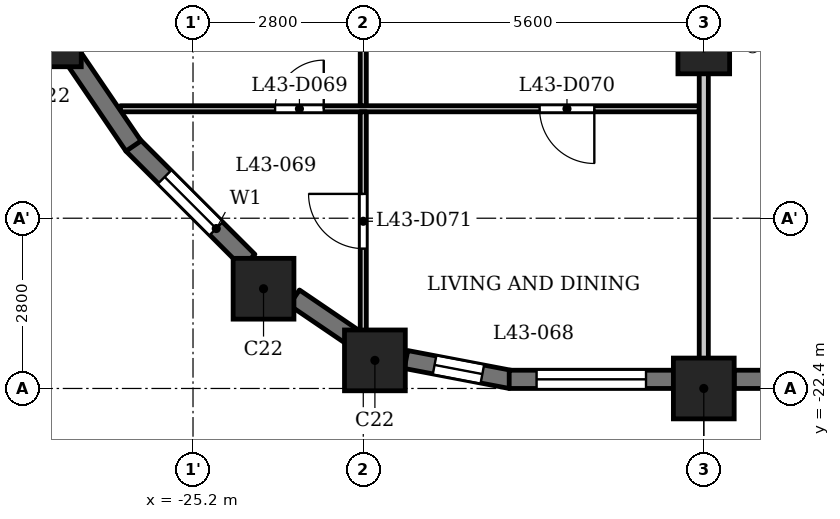
"""IFC4 building model, lengths in metres.
Left out: names, types, materials, properties, quantities, classifications, styles, units other than length and angle.
Written with IfcOpenShell. Run it as: python <this file> out.ifc"""

import sys

from ifc_helpers import new_model, si_unit, direction, frame, frame_2d, origin, origin_2d, place, context, subcontext, project, spatial, rectangle, extrude, element, fill, save


model = new_model("IFC4")
c1 = context("Model", 3, precision=1e-05, world=origin(), true_north=direction((0.0, 1.0)))
c2 = subcontext(c1, "Body", "Model", "MODEL_VIEW")
j1 = project(units=[si_unit("LENGTHUNIT", "METRE"), si_unit("PLANEANGLEUNIT", "RADIAN")], contexts=[c1])
p1 = place(None, origin())
s1 = spatial("IfcSite", under=j1, at=p1, CompositionType="ELEMENT")
p2 = place(p1, origin())
s2 = spatial("IfcBuilding", under=s1, at=p2, CompositionType="ELEMENT")
p3 = place(p2, frame((0.0, 0.0, 167.6)))
s3 = spatial("IfcBuildingStorey", under=s2, at=p3, CompositionType="ELEMENT", Elevation=167.6)
for number, where, z_axis, x_axis in (
    (1, (-22.209, -21.938, 0.0), (0.0, 0.0, 1.0), (1.0, 0.0, 0.0)),
    (2, (-16.8, -22.4, 0.0), (0.0, 0.0, 1.0), (1.0, 0.0, 0.0)),
    (3, (-27.538, -16.609, 0.0), (0.0, 0.0, 1.0), (1.0, 0.0, 0.0)),
    (4, (-24.04, -20.76, 0.0), (0.0, 0.0, 1.0), (1.0, 0.0, 0.0)),
):
    element("IfcColumn", number, at=place(p3, frame(where, z_axis=z_axis, x_axis=x_axis)), inside=s3, PredefinedType="COLUMN", context=c2, shape_type="SweptSolid", body=[
        extrude(rectangle(XDim=1.0, YDim=1.0, at=origin_2d()), origin(), (0.0, 0.0, 1.0), 3.5),
    ])
p4 = place(p3, frame((-16.8, -16.8, 0.0), z_axis=(0.0, 0.0, 1.0), x_axis=(1.0, 0.0, 0.0)))
e5 = element("IfcColumn", 5, at=p4, inside=s3, PredefinedType="COLUMN", context=c2, shape_type="SweptSolid", body=[
    extrude(rectangle(XDim=0.85, YDim=0.85, at=origin_2d()), origin(), (0.0, 0.0, 1.0), 3.5),
])
p5 = place(p3, frame((-26.197, -18.391, 0.0), z_axis=(0.0, 0.0, 1.0), x_axis=(0.707061571201, -0.707151988282, 0.0)))
e6 = element("IfcWall", 6, at=p5, inside=s3, PredefinedType="SOLIDWALL", context=c2, shape_type="SweptSolid", body=[
    extrude(rectangle(XDim=2.7, YDim=0.3, at=frame_2d((1.35, 0.0))), origin(), (0.0, 0.0, 1.0), 2.45),
])
p6 = place(p5, frame((0.75, 0.0, 0.6)))
e7 = element("IfcOpeningElement", 7, at=p6, cuts=e6, PredefinedType="OPENING", context=c2, shape_type="SweptSolid", body=[
    extrude(rectangle(XDim=1.2, YDim=1.55, at=frame_2d((0.6, 0.775))), frame((0.0, 0.16, 0.0), z_axis=(0.0, -1.0, 0.0), x_axis=(1.0, 0.0, 0.0)), (0.0, 0.0, 1.0), 0.32),
])
p7 = place(p3, frame((-23.534, -20.904, 0.0), z_axis=(0.0, 0.0, 1.0), x_axis=(0.827103906596, -0.56204904385, 0.0)))
e8 = element("IfcWall", 8, at=p7, inside=s3, PredefinedType="SOLIDWALL", context=c2, shape_type="SweptSolid", body=[
    extrude(rectangle(XDim=1.177, YDim=0.3, at=frame_2d((0.589, 0.0))), origin(), (0.0, 0.0, 1.0), 3.2),
])
p8 = place(p3, frame((-21.697, -21.924, 0.0), z_axis=(0.0, 0.0, 1.0), x_axis=(0.982284988433, -0.187393173565, 0.0)))
e9 = element("IfcWall", 9, at=p8, inside=s3, PredefinedType="SOLIDWALL", context=c2, shape_type="SweptSolid", body=[
    extrude(rectangle(XDim=1.756, YDim=0.3, at=frame_2d((0.878, 0.0))), origin(), (0.0, 0.0, 1.0), 2.45),
])
p9 = place(p8, frame((0.478, 0.0, 0.6)))
e10 = element("IfcOpeningElement", 10, at=p9, cuts=e9, PredefinedType="OPENING", context=c2, shape_type="SweptSolid", body=[
    extrude(rectangle(XDim=0.8, YDim=1.55, at=frame_2d((0.4, 0.775))), frame((0.0, 0.16, 0.0), z_axis=(0.0, -1.0, 0.0), x_axis=(1.0, 0.0, 0.0)), (0.0, 0.0, 1.0), 0.32),
])
p10 = place(p3, frame((-20.0, -22.25, 0.0), z_axis=(0.0, 0.0, 1.0), x_axis=(1.0, 0.0, 0.0)))
e11 = element("IfcWall", 11, at=p10, inside=s3, PredefinedType="SOLIDWALL", context=c2, shape_type="SweptSolid", body=[
    extrude(rectangle(XDim=2.7, YDim=0.3, at=frame_2d((1.35, 0.0))), origin(), (0.0, 0.0, 1.0), 2.45),
])
p11 = place(p10, frame((0.45, 0.0, 0.9)))
e12 = element("IfcOpeningElement", 12, at=p11, cuts=e11, PredefinedType="OPENING", context=c2, shape_type="SweptSolid", body=[
    extrude(rectangle(XDim=1.8, YDim=1.25, at=frame_2d((0.9, 0.625))), frame((0.0, 0.16, 0.0), z_axis=(0.0, -1.0, 0.0), x_axis=(1.0, 0.0, 0.0)), (0.0, 0.0, 1.0), 0.32),
])
p12 = place(p3, frame((-16.3, -22.25, 0.0), z_axis=(0.0, 0.0, 1.0), x_axis=(1.0, 0.0, 0.0)))
e13 = element("IfcWall", 13, at=p12, inside=s3, PredefinedType="SOLIDWALL", context=c2, shape_type="SweptSolid", body=[
    extrude(rectangle(XDim=4.6, YDim=0.3, at=frame_2d((2.3, 0.0))), origin(), (0.0, 0.0, 1.0), 2.45),
])
p13 = place(p12, frame((0.5, 0.0, 1.2)))
e14 = element("IfcOpeningElement", 14, at=p13, cuts=e13, PredefinedType="OPENING", context=c2, shape_type="SweptSolid", body=[
    extrude(rectangle(XDim=3.6, YDim=0.95, at=frame_2d((1.8, 0.475))), frame((0.0, 0.16, 0.0), z_axis=(0.0, -1.0, 0.0), x_axis=(1.0, 0.0, 0.0)), (0.0, 0.0, 1.0), 0.32),
])
p14 = place(p3, frame((-27.166, -16.96, 0.0), z_axis=(0.0, 0.0, 1.0), x_axis=(0.562089443061, -0.82707645233, 0.0)))
e15 = element("IfcWall", 15, at=p14, inside=s3, PredefinedType="SOLIDWALL", context=c2, shape_type="SweptSolid", body=[
    extrude(rectangle(XDim=1.756, YDim=0.3, at=frame_2d((0.878, 0.0))), origin(), (0.0, 0.0, 1.0), 2.45),
])
p15 = place(p3, frame((-26.394, -17.8, 0.0), z_axis=(0.0, 0.0, 1.0), x_axis=(1.0, 0.0, 0.0)))
e16 = element("IfcWall", 16, at=p15, inside=s3, PredefinedType="PARTITIONING", context=c2, shape_type="SweptSolid", body=[
    extrude(rectangle(XDim=9.519, YDim=0.1, at=frame_2d((4.76, 0.0))), origin(), (0.0, 0.0, 1.0), 3.2),
])
p16 = place(p15, frame((2.544, 0.0, 0.0)))
e17 = element("IfcOpeningElement", 17, at=p16, cuts=e16, PredefinedType="OPENING", context=c2, shape_type="SweptSolid", body=[
    extrude(rectangle(XDim=0.8, YDim=2.1, at=frame_2d((0.4, 1.05))), frame((0.0, 0.06, 0.0), z_axis=(0.0, -1.0, 0.0), x_axis=(1.0, 0.0, 0.0)), (0.0, 0.0, 1.0), 0.12),
])
p17 = place(p15, frame((6.894, 0.0, 0.0)))
e18 = element("IfcOpeningElement", 18, at=p17, cuts=e16, PredefinedType="OPENING", context=c2, shape_type="SweptSolid", body=[
    extrude(rectangle(XDim=0.9, YDim=2.1, at=frame_2d((0.45, 1.05))), frame((0.0, 0.06, 0.0), z_axis=(0.0, -1.0, 0.0), x_axis=(1.0, 0.0, 0.0)), (0.0, 0.0, 1.0), 0.12),
])
p18 = place(p3, frame((-22.4, -21.72, 0.0), z_axis=(0.0, 0.0, 1.0), x_axis=(0.0, 1.0, 0.0)))
e19 = element("IfcWall", 19, at=p18, inside=s3, PredefinedType="PARTITIONING", context=c2, shape_type="SweptSolid", body=[
    extrude(rectangle(XDim=3.87, YDim=0.1, at=frame_2d((1.935, 0.0))), origin(), (0.0, 0.0, 1.0), 3.2),
])
p19 = place(p18, frame((1.62, 0.0, 0.0)))
e20 = element("IfcOpeningElement", 20, at=p19, cuts=e19, PredefinedType="OPENING", context=c2, shape_type="SweptSolid", body=[
    extrude(rectangle(XDim=0.9, YDim=2.1, at=frame_2d((0.45, 1.05))), frame((0.0, 0.06, 0.0), z_axis=(0.0, -1.0, 0.0), x_axis=(1.0, 0.0, 0.0)), (0.0, 0.0, 1.0), 0.12),
])
p20 = place(p3, frame((-22.4, -17.75, 0.0), z_axis=(0.0, 0.0, 1.0), x_axis=(0.0, 1.0, 0.0)))
e21 = element("IfcWall", 21, at=p20, inside=s3, PredefinedType="PARTITIONING", context=c2, shape_type="SweptSolid", body=[
    extrude(rectangle(XDim=2.275, YDim=0.1, at=frame_2d((1.137, 0.0))), origin(), (0.0, 0.0, 1.0), 3.2),
])
p21 = place(p3, frame((-16.8, -22.88, 0.0), z_axis=(0.0, 0.0, 1.0), x_axis=(0.0, 1.0, 0.0)))
e22 = element("IfcWall", 22, at=p21, inside=s3, PredefinedType="PARTITIONING", context=c2, shape_type="SweptSolid", body=[
    extrude(rectangle(XDim=7.405, YDim=0.15, at=frame_2d((3.702, 0.0))), origin(), (0.0, 0.0, 1.0), 3.2),
])
p22 = place(p16, origin())
e23 = element("IfcDoor", 23, at=p22, inside=s3, OperationType="SINGLE_SWING_LEFT", PredefinedType="DOOR", context=c2, shape_type="SweptSolid", body=[
    extrude(rectangle(XDim=0.8, YDim=2.1, at=frame_2d((0.4, 1.05))), frame((0.0, 0.025, 0.0), z_axis=(0.0, -1.0, 0.0), x_axis=(1.0, 0.0, 0.0)), (0.0, 0.0, 1.0), 0.05),
])
fill(e17, e23)
p23 = place(p17, origin())
e24 = element("IfcDoor", 24, at=p23, inside=s3, OperationType="SINGLE_SWING_RIGHT", PredefinedType="DOOR", context=c2, shape_type="SweptSolid", body=[
    extrude(rectangle(XDim=0.9, YDim=2.1, at=frame_2d((0.45, 1.05))), frame((0.0, 0.025, 0.0), z_axis=(0.0, -1.0, 0.0), x_axis=(1.0, 0.0, 0.0)), (0.0, 0.0, 1.0), 0.05),
])
fill(e18, e24)
p24 = place(p19, origin())
e25 = element("IfcDoor", 25, at=p24, inside=s3, OperationType="SINGLE_SWING_LEFT", PredefinedType="DOOR", context=c2, shape_type="SweptSolid", body=[
    extrude(rectangle(XDim=0.9, YDim=2.1, at=frame_2d((0.45, 1.05))), frame((0.0, 0.025, 0.0), z_axis=(0.0, -1.0, 0.0), x_axis=(1.0, 0.0, 0.0)), (0.0, 0.0, 1.0), 0.05),
])
fill(e20, e25)
p25 = place(p6, origin())
e26 = element("IfcWindow", 26, at=p25, inside=s3, PartitioningType="SINGLE_PANEL", PredefinedType="WINDOW", context=c2, shape_type="SweptSolid", body=[
    extrude(rectangle(XDim=1.2, YDim=1.55, at=frame_2d((0.6, 0.775))), frame((0.0, 0.03, 0.0), z_axis=(0.0, -1.0, 0.0), x_axis=(1.0, 0.0, 0.0)), (0.0, 0.0, 1.0), 0.06),
])
fill(e7, e26)
p26 = place(p9, origin())
e27 = element("IfcWindow", 27, at=p26, inside=s3, PartitioningType="SINGLE_PANEL", PredefinedType="WINDOW", context=c2, shape_type="SweptSolid", body=[
    extrude(rectangle(XDim=0.8, YDim=1.55, at=frame_2d((0.4, 0.775))), frame((0.0, 0.03, 0.0), z_axis=(0.0, -1.0, 0.0), x_axis=(1.0, 0.0, 0.0)), (0.0, 0.0, 1.0), 0.06),
])
fill(e10, e27)
p27 = place(p11, origin())
e28 = element("IfcWindow", 28, at=p27, inside=s3, PartitioningType="SINGLE_PANEL", PredefinedType="WINDOW", context=c2, shape_type="SweptSolid", body=[
    extrude(rectangle(XDim=1.8, YDim=1.25, at=frame_2d((0.9, 0.625))), frame((0.0, 0.03, 0.0), z_axis=(0.0, -1.0, 0.0), x_axis=(1.0, 0.0, 0.0)), (0.0, 0.0, 1.0), 0.06),
])
fill(e12, e28)
save(model, sys.argv[1])
